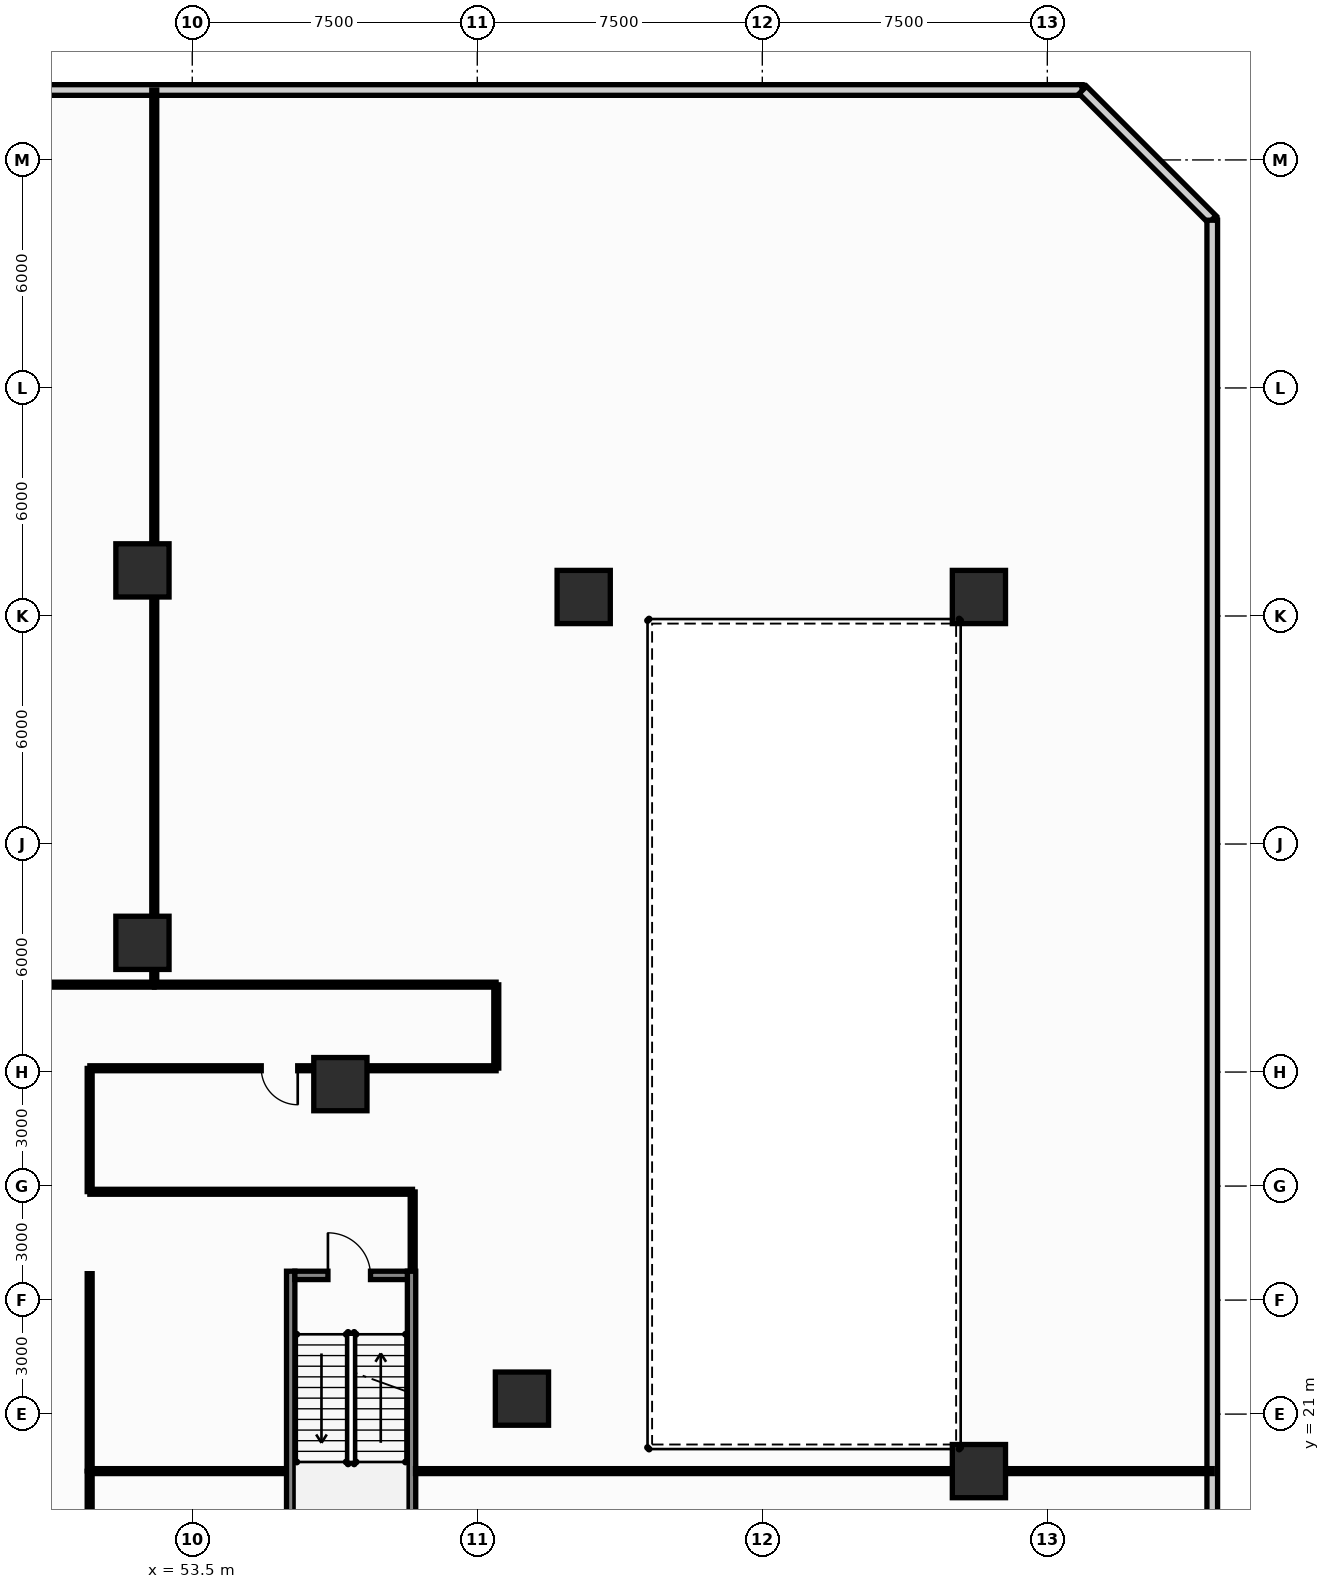
"""IFC4 building model, lengths in metres.
Left out: names, types, materials, properties, quantities, classifications, styles, units other than length and angle.
Written with IfcOpenShell. Run it as: python <this file> out.ifc"""

import sys

from ifc_helpers import new_model, si_unit, direction, frame, frame_2d, origin, origin_2d, place, context, subcontext, project, spatial, rectangle, hollow_rectangle, extrude, source, transform, mapped, element, fill, save


model = new_model("IFC4")
c1 = context("Model", 3, precision=1e-05, world=origin(), true_north=direction((0.0, 1.0)))
c2 = subcontext(c1, "Body", "Model", "MODEL_VIEW")
j1 = project(units=[si_unit("LENGTHUNIT", "METRE"), si_unit("PLANEANGLEUNIT", "RADIAN")], contexts=[c1])
p1 = place(None, origin())
s1 = spatial("IfcSite", under=j1, at=p1, CompositionType="ELEMENT")
p2 = place(p1, origin())
s2 = spatial("IfcBuilding", under=s1, at=p2, CompositionType="ELEMENT")
p3 = place(p2, frame((0.0, 0.0, 5.4)))
s3 = spatial("IfcBuildingStorey", under=s2, at=p3, CompositionType="ELEMENT", Elevation=5.4)
for number, where, z_axis, x_axis in (
    (1, (56.09, 17.18, 0.0), (0.0, 0.0, 1.0), (0.0, 1.0, 0.0)),
    (2, (59.27, 17.18, 0.0), (0.0, 0.0, 1.0), (0.0, 1.0, 0.0)),
):
    element("IfcWall", number, at=place(p3, frame(where, z_axis=z_axis, x_axis=x_axis)), inside=s3, PredefinedType="SHEAR", context=c2, shape_type="SweptSolid", body=[
        extrude(rectangle(XDim=7.58, YDim=0.22, at=frame_2d((3.79, 0.0))), origin(), (0.0, 0.0, 1.0), 4.8),
    ])
p4 = place(p3, frame((56.2, 24.65, 0.0), z_axis=(0.0, 0.0, 1.0), x_axis=(1.0, 0.0, 0.0)))
e3 = element("IfcWall", 3, at=p4, inside=s3, PredefinedType="SHEAR", context=c2, shape_type="SweptSolid", body=[
    extrude(rectangle(XDim=2.96, YDim=0.22, at=frame_2d((1.48, 0.0))), origin(), (0.0, 0.0, 1.0), 4.8),
])
p5 = place(p4, frame((0.87, 0.0, 0.0)))
e4 = element("IfcOpeningElement", 4, at=p5, cuts=e3, PredefinedType="OPENING", context=c2, shape_type="SweptSolid", body=[
    extrude(rectangle(XDim=1.12, YDim=2.15, at=frame_2d((0.56, 1.075))), frame((0.0, 0.122, 0.0), z_axis=(0.0, -1.0, 0.0), x_axis=(1.0, 0.0, 0.0)), (0.0, 0.0, 1.0), 0.244),
])
m1 = source(origin(), c2, "Body", "SweptSolid", [
    extrude(hollow_rectangle(XDim=1.4, YDim=1.4, WallThickness=0.08, at=origin_2d()), origin(), (0.0, 0.0, 1.0), 4.802),
])
p6 = place(p3, frame((62.175, 21.407, 0.0), z_axis=(-0.01042374304, -0.021559351459, 0.999713228854), x_axis=(0.900293483537, -0.435283405956, 0.0)))
e5 = element("IfcColumn", 5, at=p6, inside=s3, PredefinedType="COLUMN", context=c2, shape_type="MappedRepresentation", body=[
    mapped(m1, transform((0.0, 0.0, 0.0), scale=1.0)),
])
m2 = source(origin(), c2, "Body", "SweptSolid", [
    extrude(hollow_rectangle(XDim=1.4, YDim=1.4, WallThickness=0.08, at=origin_2d()), origin(), (0.0, 0.0, 1.0), 4.801),
])
p7 = place(p3, frame((57.397, 29.682, 0.0), z_axis=(-0.014899529501, -0.013780793498, 0.999794025663), x_axis=(0.679008224545, -0.734130663438, 0.0)))
e6 = element("IfcColumn", 6, at=p7, inside=s3, PredefinedType="COLUMN", context=c2, shape_type="MappedRepresentation", body=[
    mapped(m2, transform((0.0, 0.0, 0.0), scale=1.0)),
])
m3 = source(origin(), c2, "Body", "SweptSolid", [
    extrude(hollow_rectangle(XDim=1.4, YDim=1.4, WallThickness=0.08, at=origin_2d()), origin(), (0.0, 0.0, 1.0), 4.8),
])
for number, where, z_axis, x_axis in (
    (7, (52.189, 33.4, 0.0), (0.0, 0.0, 1.0), (1.0, 0.0, 0.0)),
    (8, (52.189, 43.2, 0.0), (0.0, 0.0, 1.0), (1.0, 0.0, 0.0)),
    (9, (74.2, 19.5, 0.0), (0.0, 0.0, 1.0), (1.0, 0.0, 0.0)),
    (10, (74.2, 42.5, 0.0), (0.0, 0.0, 1.0), (1.0, 0.0, 0.0)),
    (11, (63.8, 42.5, 0.0), (0.0, 0.0, 1.0), (1.0, 0.0, 0.0)),
):
    element("IfcColumn", number, at=place(p3, frame(where, z_axis=z_axis, x_axis=x_axis)), inside=s3, PredefinedType="COLUMN", context=c2, shape_type="MappedRepresentation", body=[
        mapped(m3, transform((0.0, 0.0, 0.0), scale=1.0)),
    ])
p8 = place(p3, frame((5.086, 55.84, 0.0), z_axis=(0.0, 0.0, 1.0), x_axis=(1.0, 0.0, 0.0)))
e12 = element("IfcWall", 12, at=p8, inside=s3, PredefinedType="STANDARD", context=c2, shape_type="SweptSolid", body=[
    extrude(rectangle(XDim=71.828, YDim=0.28, at=frame_2d((35.914, 0.0))), origin(), (0.0, 0.0, 1.0), 4.48),
])
p9 = place(p3, frame((76.934, 55.84, 0.0), z_axis=(0.0, 0.0, 1.0), x_axis=(0.707106781187, -0.707106781187, 0.0)))
e13 = element("IfcWall", 13, at=p9, inside=s3, PredefinedType="STANDARD", context=c2, shape_type="SweptSolid", body=[
    extrude(rectangle(XDim=4.817, YDim=0.28, at=frame_2d((2.408, 0.0))), origin(), (0.0, 0.0, 1.0), 4.48),
])
p10 = place(p3, frame((80.34, 52.414, 0.0), z_axis=(0.0, 0.0, 1.0), x_axis=(0.0, -1.0, 0.0)))
e14 = element("IfcWall", 14, at=p10, inside=s3, PredefinedType="STANDARD", context=c2, shape_type="SweptSolid", body=[
    extrude(rectangle(XDim=47.828, YDim=0.28, at=frame_2d((23.914, 0.0))), origin(), (0.0, 0.0, 1.0), 4.48),
])
p11 = place(p3, frame((52.5, 32.305, 0.0), z_axis=(0.0, 0.0, 1.0), x_axis=(0.0, 1.0, 0.0)))
e15 = element("IfcWall", 15, at=p11, inside=s3, PredefinedType="PARTITIONING", context=c2, shape_type="SweptSolid", body=[
    extrude(rectangle(XDim=23.535, YDim=0.13, at=frame_2d((11.768, 0.0))), origin(), (0.0, 0.0, 1.0), 3.465),
])
p12 = place(p3, frame((59.375, 19.5, 0.0), z_axis=(0.0, 0.0, 1.0), x_axis=(1.0, 0.0, 0.0)))
e16 = element("IfcWall", 16, at=p12, inside=s3, PredefinedType="PARTITIONING", context=c2, shape_type="SweptSolid", body=[
    extrude(rectangle(XDim=20.965, YDim=0.13, at=frame_2d((10.482, 0.0))), origin(), (0.0, 0.0, 1.0), 2.665),
])
p13 = place(p3, frame((61.495, 30.1, 0.0), z_axis=(0.0, 0.0, 1.0), x_axis=(-1.0, 0.0, 0.0)))
e17 = element("IfcWall", 17, at=p13, inside=s3, PredefinedType="PARTITIONING", context=c2, shape_type="SweptSolid", body=[
    extrude(rectangle(XDim=10.69, YDim=0.13, at=frame_2d((5.345, 0.0))), origin(), (0.0, 0.0, 1.0), 3.854),
])
p14 = place(p13, frame((5.22, 0.0, 0.0)))
e18 = element("IfcOpeningElement", 18, at=p14, cuts=e17, PredefinedType="OPENING", context=c2, shape_type="SweptSolid", body=[
    extrude(rectangle(XDim=0.96, YDim=2.15, at=frame_2d((0.48, 1.075))), frame((0.0, 0.077, 0.0), z_axis=(0.0, -1.0, 0.0), x_axis=(1.0, 0.0, 0.0)), (0.0, 0.0, 1.0), 0.154),
])
p15 = place(p3, frame((42.505, 32.3, 0.0), z_axis=(0.0, 0.0, 1.0), x_axis=(1.0, 0.0, 0.0)))
e19 = element("IfcWall", 19, at=p15, inside=s3, PredefinedType="PARTITIONING", context=c2, shape_type="SweptSolid", body=[
    extrude(rectangle(XDim=9.99, YDim=0.13, at=frame_2d((4.995, 0.0))), origin(), (0.0, 0.0, 1.0), 4.48),
])
p16 = place(p15, frame((4.515, 0.0, 0.0)))
e20 = element("IfcOpeningElement", 20, at=p16, cuts=e19, PredefinedType="OPENING", context=c2, shape_type="SweptSolid", body=[
    extrude(rectangle(XDim=0.96, YDim=2.15, at=frame_2d((0.48, 1.075))), frame((0.0, 0.077, 0.0), z_axis=(0.0, -1.0, 0.0), x_axis=(1.0, 0.0, 0.0)), (0.0, 0.0, 1.0), 0.154),
])
p17 = place(p3, frame((52.505, 32.3, 0.0), z_axis=(0.0, 0.0, 1.0), x_axis=(1.0, 0.0, 0.0)))
e21 = element("IfcWall", 21, at=p17, inside=s3, PredefinedType="PARTITIONING", context=c2, shape_type="SweptSolid", body=[
    extrude(rectangle(XDim=8.99, YDim=0.13, at=frame_2d((4.495, 0.0))), origin(), (0.0, 0.0, 1.0), 4.48),
])
p18 = place(p3, frame((50.805, 26.85, 0.0), z_axis=(0.0, 0.0, 1.0), x_axis=(1.0, 0.0, 0.0)))
e22 = element("IfcWall", 22, at=p18, inside=s3, PredefinedType="PARTITIONING", context=c2, shape_type="SweptSolid", body=[
    extrude(rectangle(XDim=8.49, YDim=0.13, at=frame_2d((4.245, 0.0))), origin(), (0.0, 0.0, 1.0), 4.48),
])
p19 = place(p3, frame((50.8, 12.205, 0.0), z_axis=(0.0, 0.0, 1.0), x_axis=(0.0, 1.0, 0.0)))
e23 = element("IfcWall", 23, at=p19, inside=s3, PredefinedType="PARTITIONING", context=c2, shape_type="SweptSolid", body=[
    extrude(rectangle(XDim=7.29, YDim=0.13, at=frame_2d((3.645, 0.0))), origin(), (0.0, 0.0, 1.0), 4.48),
])
p20 = place(p19, frame((3.165, 0.0, 0.0)))
e24 = element("IfcOpeningElement", 24, at=p20, cuts=e23, PredefinedType="OPENING", context=c2, shape_type="SweptSolid", body=[
    extrude(rectangle(XDim=0.96, YDim=2.15, at=frame_2d((0.48, 1.075))), frame((0.0, 0.077, 0.0), z_axis=(0.0, -1.0, 0.0), x_axis=(1.0, 0.0, 0.0)), (0.0, 0.0, 1.0), 0.154),
])
p21 = place(p3, frame((50.805, 19.5, 0.0), z_axis=(0.0, 0.0, 1.0), x_axis=(1.0, 0.0, 0.0)))
e25 = element("IfcWall", 25, at=p21, inside=s3, PredefinedType="PARTITIONING", context=c2, shape_type="SweptSolid", body=[
    extrude(rectangle(XDim=5.17, YDim=0.13, at=frame_2d((2.585, 0.0))), origin(), (0.0, 0.0, 1.0), 4.48),
])
p22 = place(p3, frame((50.8, 24.695, 0.0), z_axis=(0.0, 0.0, 1.0), x_axis=(0.0, -1.0, 0.0)))
e26 = element("IfcWall", 26, at=p22, inside=s3, PredefinedType="PARTITIONING", context=c2, shape_type="SweptSolid", body=[
    extrude(rectangle(XDim=5.19, YDim=0.13, at=frame_2d((2.595, 0.0))), origin(), (0.0, 0.0, 1.0), 4.48),
])
p23 = place(p3, frame((50.8, 30.095, 0.0), z_axis=(0.0, 0.0, 1.0), x_axis=(0.0, -1.0, 0.0)))
e27 = element("IfcWall", 27, at=p23, inside=s3, PredefinedType="PARTITIONING", context=c2, shape_type="SweptSolid", body=[
    extrude(rectangle(XDim=3.24, YDim=0.13, at=frame_2d((1.62, 0.0))), origin(), (0.0, 0.0, 1.0), 4.48),
])
p24 = place(p3, frame((61.5, 32.295, 0.0), z_axis=(0.0, 0.0, 1.0), x_axis=(0.0, -1.0, 0.0)))
e28 = element("IfcWall", 28, at=p24, inside=s3, PredefinedType="PARTITIONING", context=c2, shape_type="SweptSolid", body=[
    extrude(rectangle(XDim=2.19, YDim=0.13, at=frame_2d((1.095, 0.0))), origin(), (0.0, 0.0, 1.0), 4.48),
])
p25 = place(p3, frame((59.3, 26.845, 0.0), z_axis=(0.0, 0.0, 1.0), x_axis=(0.0, -1.0, 0.0)))
e29 = element("IfcWall", 29, at=p25, inside=s3, PredefinedType="PARTITIONING", context=c2, shape_type="SweptSolid", body=[
    extrude(rectangle(XDim=2.07, YDim=0.13, at=frame_2d((1.035, 0.0))), origin(), (0.0, 0.0, 1.0), 4.48),
])
p26 = place(p5, origin())
e30 = element("IfcDoor", 30, at=p26, inside=s3, OperationType="SINGLE_SWING_LEFT", PredefinedType="DOOR", context=c2, shape_type="SweptSolid", body=[
    extrude(rectangle(XDim=1.12, YDim=2.15, at=frame_2d((0.56, 1.075))), frame((0.0, 0.025, 0.0), z_axis=(0.0, -1.0, 0.0), x_axis=(1.0, 0.0, 0.0)), (0.0, 0.0, 1.0), 0.05),
])
fill(e4, e30)
p27 = place(p14, origin())
e31 = element("IfcDoor", 31, at=p27, inside=s3, OperationType="SINGLE_SWING_LEFT", PredefinedType="DOOR", context=c2, shape_type="SweptSolid", body=[
    extrude(rectangle(XDim=0.96, YDim=2.15, at=frame_2d((0.48, 1.075))), frame((0.0, 0.025, 0.0), z_axis=(0.0, -1.0, 0.0), x_axis=(1.0, 0.0, 0.0)), (0.0, 0.0, 1.0), 0.05),
])
fill(e18, e31)
save(model, sys.argv[1])
